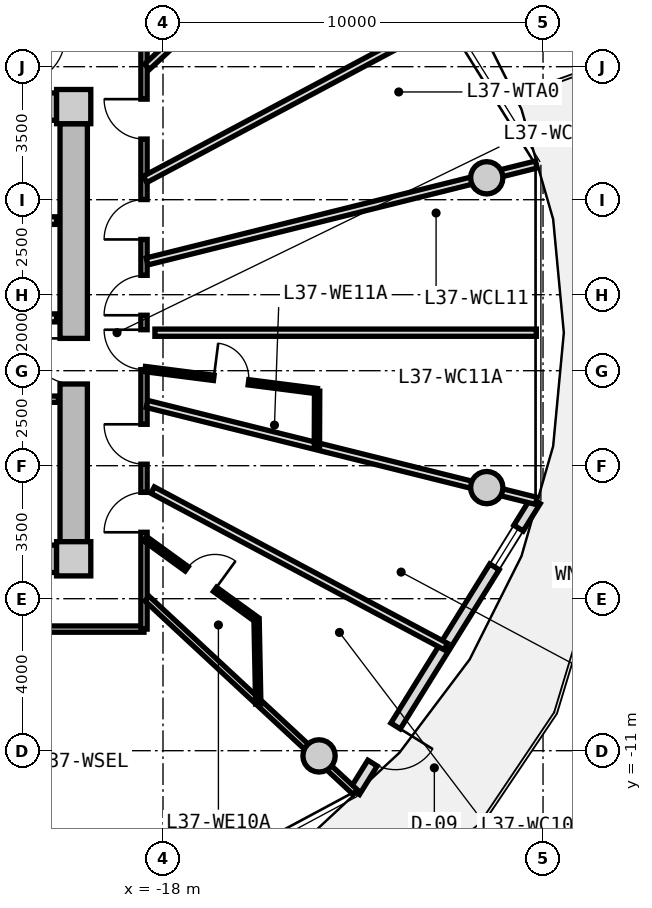
"""IFC4 building model, lengths in metres.
Left out: names, types, materials, properties, quantities, classifications, styles, units other than length and angle.
Written with IfcOpenShell. Run it as: python <this file> out.ifc"""

import sys

from ifc_helpers import new_model, si_unit, direction, frame, frame_2d, origin, origin_2d, place, context, subcontext, project, spatial, rectangle, circle, extrude, source, transform, mapped, element, fill, save


model = new_model("IFC4")
c1 = context("Model", 3, precision=1e-05, world=origin(), true_north=direction((0.0, 1.0)))
c2 = subcontext(c1, "Body", "Model", "MODEL_VIEW")
j1 = project(units=[si_unit("LENGTHUNIT", "METRE"), si_unit("PLANEANGLEUNIT", "RADIAN")], contexts=[c1])
p1 = place(None, origin())
s1 = spatial("IfcSite", under=j1, at=p1, CompositionType="ELEMENT")
p2 = place(p1, origin())
s2 = spatial("IfcBuilding", under=s1, at=p2, CompositionType="ELEMENT")
p3 = place(p2, frame((0.0, 0.0, 120.65)))
s3 = spatial("IfcBuildingStorey", under=s2, at=p3, CompositionType="ELEMENT", Elevation=120.65)
m1 = source(origin(), c2, "Body", "SweptSolid", [
    extrude(rectangle(XDim=0.9, YDim=0.9, at=origin_2d()), origin(), (0.0, 0.0, 1.0), 3.05),
])
for number, where, z_axis, x_axis in (
    (1, (-20.35, -5.95, 0.0), (0.0, 0.0, 1.0), (1.0, 0.0, 0.0)),
    (2, (-20.35, 5.95, 0.0), (0.0, 0.0, 1.0), (1.0, 0.0, 0.0)),
):
    element("IfcColumn", number, at=place(p3, frame(where, z_axis=z_axis, x_axis=x_axis)), inside=s3, PredefinedType="COLUMN", context=c2, shape_type="MappedRepresentation", body=[
        mapped(m1, transform((0.0, 0.0, 0.0), x_axis=(1.0, 0.0, 0.0), y_axis=(0.0, 1.0, 0.0), z_axis=(0.0, 0.0, 1.0), scale=1.0)),
    ])
m2 = source(origin(), c2, "Body", "SweptSolid", [
    extrude(rectangle(XDim=14.4, YDim=0.72, at=frame_2d((7.2, 0.0))), origin(), (0.0, 0.0, 1.0), 2.79),
])
for number, where, z_axis, x_axis in (
    (3, (-35.2, 5.95, 0.0), (0.0, 0.0, 1.0), (1.0, 0.0, 0.0)),
    (4, (-20.8, -5.95, 0.0), (0.0, 0.0, 1.0), (-1.0, 0.0, 0.0)),
):
    element("IfcWall", number, at=place(p3, frame(where, z_axis=z_axis, x_axis=x_axis)), inside=s3, PredefinedType="SHEAR", context=c2, shape_type="MappedRepresentation", body=[
        mapped(m2, transform((0.0, 0.0, 0.0), x_axis=(1.0, 0.0, 0.0), y_axis=(0.0, 1.0, 0.0), z_axis=(0.0, 0.0, 1.0), scale=1.0)),
    ])
m3 = source(origin(), c2, "Body", "SweptSolid", [
    extrude(rectangle(XDim=11.0, YDim=0.72, at=frame_2d((5.5, 0.0))), origin(), (0.0, 0.0, 1.0), 2.79),
])
p4 = place(p3, frame((-20.35, 5.5, 0.0), z_axis=(0.0, 0.0, 1.0), x_axis=(0.0, -1.0, 0.0)))
e5 = element("IfcWall", 5, at=p4, inside=s3, PredefinedType="SHEAR", context=c2, shape_type="MappedRepresentation", body=[
    mapped(m3, transform((0.0, 0.0, 0.0), x_axis=(1.0, 0.0, 0.0), y_axis=(0.0, 1.0, 0.0), z_axis=(0.0, 0.0, 1.0), scale=1.0)),
])
p5 = place(p4, frame((5.65, 0.0, 0.0)))
e6 = element("IfcOpeningElement", 6, at=p5, cuts=e5, PredefinedType="OPENING", context=c2, shape_type="SweptSolid", body=[
    extrude(rectangle(XDim=1.2, YDim=2.15, at=frame_2d((0.6, 1.075))), frame((0.0, 0.37, 0.0), z_axis=(0.0, -1.0, 0.0), x_axis=(1.0, 0.0, 0.0)), (0.0, 0.0, 1.0), 0.74),
])
m4 = source(origin(), c2, "Body", "SweptSolid", [
    extrude(circle(Radius=0.425, at=origin_2d()), origin(), (0.0, 0.0, 1.0), 3.05),
])
for number, where, z_axis, x_axis in (
    (7, (-9.481, 4.076, 0.0), (0.0, 0.0, 1.0), (1.0, 0.0, 0.0)),
    (8, (-13.894, -11.137, 0.0), (0.0, 0.0, 1.0), (1.0, 0.0, 0.0)),
    (9, (-9.481, -4.076, 0.0), (0.0, 0.0, 1.0), (1.0, 0.0, 0.0)),
):
    element("IfcColumn", number, at=place(p3, frame(where, z_axis=z_axis, x_axis=x_axis)), inside=s3, PredefinedType="COLUMN", context=c2, shape_type="MappedRepresentation", body=[
        mapped(m4, transform((0.0, 0.0, 0.0), x_axis=(1.0, 0.0, 0.0), y_axis=(0.0, 1.0, 0.0), z_axis=(0.0, 0.0, 1.0), scale=1.0)),
    ])
m5 = source(origin(), c2, "Body", "SweptSolid", [
    extrude(rectangle(XDim=9.014, YDim=0.29, at=frame_2d((4.507, 0.0))), origin(), (0.0, 0.0, 1.0), 2.79),
])
p6 = place(p3, frame((-8.196, -4.421, 0.0), z_axis=(0.0, 0.0, 1.0), x_axis=(-0.527732945084, -0.849410347637, 0.0)))
e10 = element("IfcWall", 10, at=p6, inside=s3, PredefinedType="SOLIDWALL", context=c2, shape_type="MappedRepresentation", body=[
    mapped(m5, transform((0.0, 0.0, 0.0), x_axis=(1.0, 0.0, 0.0), y_axis=(0.0, 1.0, 0.0), z_axis=(0.0, 0.0, 1.0), scale=1.0)),
])
p7 = place(p6, frame((6.98, 0.0, 0.0)))
e11 = element("IfcOpeningElement", 11, at=p7, cuts=e10, PredefinedType="OPENING", context=c2, shape_type="SweptSolid", body=[
    extrude(rectangle(XDim=1.15, YDim=2.25, at=frame_2d((0.575, 1.125))), frame((0.0, 0.155, 0.0), z_axis=(0.0, -1.0, 0.0), x_axis=(1.0, 0.0, 0.0)), (0.0, 0.0, 1.0), 0.31),
])
p8 = place(p6, frame((0.85, 0.0, 0.85)))
e12 = element("IfcOpeningElement", 12, at=p8, cuts=e10, PredefinedType="OPENING", context=c2, shape_type="SweptSolid", body=[
    extrude(rectangle(XDim=1.2, YDim=1.5, at=frame_2d((0.6, 0.75))), frame((0.0, 0.155, 0.0), z_axis=(0.0, -1.0, 0.0), x_axis=(1.0, 0.0, 0.0)), (0.0, 0.0, 1.0), 0.31),
])
m6 = source(origin(), c2, "Body", "SweptSolid", [
    extrude(rectangle(XDim=3.2, YDim=0.2, at=frame_2d((1.6, 0.0))), origin(), (0.0, 0.0, 1.0), 2.775),
])
p9 = place(p3, frame((-24.0, 2.95, 0.0), z_axis=(0.0, 0.0, 1.0), x_axis=(1.0, 0.0, 0.0)))
e13 = element("IfcWall", 13, at=p9, inside=s3, PredefinedType="PARTITIONING", context=c2, shape_type="MappedRepresentation", body=[
    mapped(m6, transform((0.0, 0.0, 0.0), x_axis=(1.0, 0.0, 0.0), y_axis=(0.0, 1.0, 0.0), z_axis=(0.0, 0.0, 1.0), scale=1.0)),
])
m7 = source(origin(), c2, "Body", "SweptSolid", [
    extrude(rectangle(XDim=6.66, YDim=0.21, at=frame_2d((3.33, 0.0))), origin(), (0.0, 0.0, 1.0), 2.775),
])
p10 = place(p3, frame((-27.46, 0.39, 0.0), z_axis=(0.0, 0.0, 1.0), x_axis=(1.0, 0.0, 0.0)))
e14 = element("IfcWall", 14, at=p10, inside=s3, PredefinedType="PARTITIONING", context=c2, shape_type="MappedRepresentation", body=[
    mapped(m7, transform((0.0, 0.0, 0.0), x_axis=(1.0, 0.0, 0.0), y_axis=(0.0, 1.0, 0.0), z_axis=(0.0, 0.0, 1.0), scale=1.0)),
])
p11 = place(p10, frame((1.0, 0.0, 0.0)))
e15 = element("IfcOpeningElement", 15, at=p11, cuts=e14, PredefinedType="OPENING", context=c2, shape_type="SweptSolid", body=[
    extrude(rectangle(XDim=1.2, YDim=2.15, at=frame_2d((0.6, 1.075))), frame((0.0, 0.115, 0.0), z_axis=(0.0, -1.0, 0.0), x_axis=(1.0, 0.0, 0.0)), (0.0, 0.0, 1.0), 0.23),
])
m8 = source(origin(), c2, "Body", "SweptSolid", [
    extrude(rectangle(XDim=2.7, YDim=0.165, at=frame_2d((1.35, 0.0))), origin(), (0.0, 0.0, 1.0), 2.775),
])
p12 = place(p3, frame((-23.45, -1.75, 0.0), z_axis=(0.0, 0.0, 1.0), x_axis=(1.0, 0.0, 0.0)))
e16 = element("IfcWall", 16, at=p12, inside=s3, PredefinedType="PARTITIONING", context=c2, shape_type="MappedRepresentation", body=[
    mapped(m8, transform((0.0, 0.0, 0.0), x_axis=(1.0, 0.0, 0.0), y_axis=(0.0, 1.0, 0.0), z_axis=(0.0, 0.0, 1.0), scale=1.0)),
])
p13 = place(p12, frame((0.85, 0.0, 0.0)))
e17 = element("IfcOpeningElement", 17, at=p13, cuts=e16, PredefinedType="OPENING", context=c2, shape_type="SweptSolid", body=[
    extrude(rectangle(XDim=0.925, YDim=2.1, at=frame_2d((0.462, 1.05))), frame((0.0, 0.093, 0.0), z_axis=(0.0, -1.0, 0.0), x_axis=(1.0, 0.0, 0.0)), (0.0, 0.0, 1.0), 0.185),
])
m9 = source(origin(), c2, "Body", "SweptSolid", [
    extrude(rectangle(XDim=8.6, YDim=0.165, at=frame_2d((4.3, 0.0))), origin(), (0.0, 0.0, 1.0), 2.775),
])
p14 = place(p3, frame((-18.5, -7.8, 0.0), z_axis=(0.0, 0.0, 1.0), x_axis=(-1.0, 0.0, 0.0)))
e18 = element("IfcWall", 18, at=p14, inside=s3, PredefinedType="PARTITIONING", context=c2, shape_type="MappedRepresentation", body=[
    mapped(m9, transform((0.0, 0.0, 0.0), x_axis=(1.0, 0.0, 0.0), y_axis=(0.0, 1.0, 0.0), z_axis=(0.0, 0.0, 1.0), scale=1.0)),
])
p15 = place(p14, frame((3.509, 0.0, 0.0)))
e19 = element("IfcOpeningElement", 19, at=p15, cuts=e18, PredefinedType="OPENING", context=c2, shape_type="SweptSolid", body=[
    extrude(rectangle(XDim=1.05, YDim=2.15, at=frame_2d((0.525, 1.075))), frame((0.0, 0.093, 0.0), z_axis=(0.0, -1.0, 0.0), x_axis=(1.0, 0.0, 0.0)), (0.0, 0.0, 1.0), 0.185),
])
m10 = source(origin(), c2, "Body", "SweptSolid", [
    extrude(rectangle(XDim=15.6, YDim=0.165, at=frame_2d((7.8, 0.0))), origin(), (0.0, 0.0, 1.0), 2.775),
])
p16 = place(p3, frame((-18.5, 7.8, 0.0), z_axis=(0.0, 0.0, 1.0), x_axis=(0.0, -1.0, 0.0)))
e20 = element("IfcWall", 20, at=p16, inside=s3, PredefinedType="PARTITIONING", context=c2, shape_type="MappedRepresentation", body=[
    mapped(m10, transform((0.0, 0.0, 0.0), x_axis=(1.0, 0.0, 0.0), y_axis=(0.0, 1.0, 0.0), z_axis=(0.0, 0.0, 1.0), scale=1.0)),
])
p17 = place(p16, frame((12.002, 0.0, 0.0)))
e21 = element("IfcOpeningElement", 21, at=p17, cuts=e20, PredefinedType="OPENING", context=c2, shape_type="SweptSolid", body=[
    extrude(rectangle(XDim=1.05, YDim=2.15, at=frame_2d((0.525, 1.075))), frame((0.0, 0.093, 0.0), z_axis=(0.0, -1.0, 0.0), x_axis=(1.0, 0.0, 0.0)), (0.0, 0.0, 1.0), 0.185),
])
p18 = place(p16, frame((10.211, 0.0, 0.0)))
e22 = element("IfcOpeningElement", 22, at=p18, cuts=e20, PredefinedType="OPENING", context=c2, shape_type="SweptSolid", body=[
    extrude(rectangle(XDim=1.05, YDim=2.15, at=frame_2d((0.525, 1.075))), frame((0.0, 0.093, 0.0), z_axis=(0.0, -1.0, 0.0), x_axis=(1.0, 0.0, 0.0)), (0.0, 0.0, 1.0), 0.185),
])
p19 = place(p16, frame((7.722, 0.0, 0.0)))
e23 = element("IfcOpeningElement", 23, at=p19, cuts=e20, PredefinedType="OPENING", context=c2, shape_type="SweptSolid", body=[
    extrude(rectangle(XDim=1.05, YDim=2.15, at=frame_2d((0.525, 1.075))), frame((0.0, 0.093, 0.0), z_axis=(0.0, -1.0, 0.0), x_axis=(1.0, 0.0, 0.0)), (0.0, 0.0, 1.0), 0.185),
])
p20 = place(p16, frame((6.291, 0.0, 0.0)))
e24 = element("IfcOpeningElement", 24, at=p20, cuts=e20, PredefinedType="OPENING", context=c2, shape_type="SweptSolid", body=[
    extrude(rectangle(XDim=1.05, YDim=2.15, at=frame_2d((0.525, 1.075))), frame((0.0, 0.093, 0.0), z_axis=(0.0, -1.0, 0.0), x_axis=(1.0, 0.0, 0.0)), (0.0, 0.0, 1.0), 0.185),
])
p21 = place(p16, frame((4.296, 0.0, 0.0)))
e25 = element("IfcOpeningElement", 25, at=p21, cuts=e20, PredefinedType="OPENING", context=c2, shape_type="SweptSolid", body=[
    extrude(rectangle(XDim=1.05, YDim=2.15, at=frame_2d((0.525, 1.075))), frame((0.0, 0.093, 0.0), z_axis=(0.0, -1.0, 0.0), x_axis=(1.0, 0.0, 0.0)), (0.0, 0.0, 1.0), 0.185),
])
p22 = place(p16, frame((1.654, 0.0, 0.0)))
e26 = element("IfcOpeningElement", 26, at=p22, cuts=e20, PredefinedType="OPENING", context=c2, shape_type="SweptSolid", body=[
    extrude(rectangle(XDim=1.05, YDim=2.15, at=frame_2d((0.525, 1.075))), frame((0.0, 0.093, 0.0), z_axis=(0.0, -1.0, 0.0), x_axis=(1.0, 0.0, 0.0)), (0.0, 0.0, 1.0), 0.185),
])
m11 = source(origin(), c2, "Body", "SweptSolid", [
    extrude(rectangle(XDim=7.482, YDim=0.165, at=frame_2d((3.741, 0.0))), origin(), (0.0, 0.0, 1.0), 2.275),
])
p23 = place(p3, frame((-18.42, -6.998, 0.0), z_axis=(0.0, 0.0, 1.0), x_axis=(0.732508698043, -0.680757671489, 0.0)))
e27 = element("IfcWall", 27, at=p23, inside=s3, PredefinedType="PARTITIONING", context=c2, shape_type="MappedRepresentation", body=[
    mapped(m11, transform((0.0, 0.0, 0.0), x_axis=(1.0, 0.0, 0.0), y_axis=(0.0, 1.0, 0.0), z_axis=(0.0, 0.0, 1.0), scale=1.0)),
])
m12 = source(origin(), c2, "Body", "SweptSolid", [
    extrude(rectangle(XDim=10.556, YDim=0.19, at=frame_2d((5.278, 0.0))), origin(), (0.0, 0.0, 1.0), 2.275),
])
p24 = place(p3, frame((-18.42, -1.875, 0.0), z_axis=(0.0, 0.0, 1.0), x_axis=(0.970363857851, -0.241648470667, 0.0)))
e28 = element("IfcWall", 28, at=p24, inside=s3, PredefinedType="PARTITIONING", context=c2, shape_type="MappedRepresentation", body=[
    mapped(m12, transform((0.0, 0.0, 0.0), x_axis=(1.0, 0.0, 0.0), y_axis=(0.0, 1.0, 0.0), z_axis=(0.0, 0.0, 1.0), scale=1.0)),
])
m13 = source(origin(), c2, "Body", "SweptSolid", [
    extrude(rectangle(XDim=8.744, YDim=0.19, at=frame_2d((4.372, 0.0))), origin(), (0.0, 0.0, 1.0), 2.775),
])
p25 = place(p3, frame((-18.273, -4.142, 0.0), z_axis=(0.0, 0.0, 1.0), x_axis=(0.882252449936, -0.470776607938, 0.0)))
e29 = element("IfcWall", 29, at=p25, inside=s3, PredefinedType="PARTITIONING", context=c2, shape_type="MappedRepresentation", body=[
    mapped(m13, transform((0.0, 0.0, 0.0), x_axis=(1.0, 0.0, 0.0), y_axis=(0.0, 1.0, 0.0), z_axis=(0.0, 0.0, 1.0), scale=1.0)),
])
m14 = source(origin(), c2, "Body", "SweptSolid", [
    extrude(rectangle(XDim=3.621, YDim=0.14, at=frame_2d((1.811, 0.0))), origin(), (0.0, 0.0, 1.0), 2.775),
])
p26 = place(p3, frame((-18.47, -5.422, 0.0), z_axis=(0.0, 0.0, 1.0), x_axis=(0.80968252222, -0.586868139544, 0.0)))
e30 = element("IfcWall", 30, at=p26, inside=s3, PredefinedType="PARTITIONING", context=c2, shape_type="MappedRepresentation", body=[
    mapped(m14, transform((0.0, 0.0, 0.0), x_axis=(1.0, 0.0, 0.0), y_axis=(0.0, 1.0, 0.0), z_axis=(0.0, 0.0, 1.0), scale=1.0)),
])
p27 = place(p26, frame((1.351, 0.0, 0.0)))
e31 = element("IfcOpeningElement", 31, at=p27, cuts=e30, PredefinedType="OPENING", context=c2, shape_type="SweptSolid", body=[
    extrude(rectangle(XDim=0.92, YDim=2.1, at=frame_2d((0.46, 1.05))), frame((0.0, 0.08, 0.0), z_axis=(0.0, -1.0, 0.0), x_axis=(1.0, 0.0, 0.0)), (0.0, 0.0, 1.0), 0.16),
])
m15 = source(origin(), c2, "Body", "SweptSolid", [
    extrude(rectangle(XDim=2.225, YDim=0.14, at=frame_2d((1.112, 0.0))), origin(), (0.0, 0.0, 1.0), 2.775),
])
p28 = place(p3, frame((-15.538, -7.547, 0.0), z_axis=(0.0, 0.0, 1.0), x_axis=(0.019971869027, -0.999800542332, 0.0)))
e32 = element("IfcWall", 32, at=p28, inside=s3, PredefinedType="PARTITIONING", context=c2, shape_type="MappedRepresentation", body=[
    mapped(m15, transform((0.0, 0.0, 0.0), x_axis=(1.0, 0.0, 0.0), y_axis=(0.0, 1.0, 0.0), z_axis=(0.0, 0.0, 1.0), scale=1.0)),
])
p29 = place(p3, frame((-18.42, 1.875, 0.0), z_axis=(0.0, 0.0, 1.0), x_axis=(0.970363857851, 0.241648470667, 0.0)))
e33 = element("IfcWall", 33, at=p29, inside=s3, PredefinedType="PARTITIONING", context=c2, shape_type="MappedRepresentation", body=[
    mapped(m12, transform((0.0, 0.0, 0.0), x_axis=(1.0, 0.0, 0.0), y_axis=(0.0, 1.0, 0.0), z_axis=(0.0, 0.0, 1.0), scale=1.0)),
])
m16 = source(origin(), c2, "Body", "SweptSolid", [
    extrude(rectangle(XDim=10.036, YDim=0.19, at=frame_2d((5.018, 0.0))), origin(), (0.0, 0.0, 1.0), 2.775),
])
p30 = place(p3, frame((-18.213, 0.0, 0.0), z_axis=(0.0, 0.0, 1.0), x_axis=(1.0, 0.0, 0.0)))
e34 = element("IfcWall", 34, at=p30, inside=s3, PredefinedType="PARTITIONING", context=c2, shape_type="MappedRepresentation", body=[
    mapped(m16, transform((0.0, 0.0, 0.0), x_axis=(1.0, 0.0, 0.0), y_axis=(0.0, 1.0, 0.0), z_axis=(0.0, 0.0, 1.0), scale=1.0)),
])
m17 = source(origin(), c2, "Body", "SweptSolid", [
    extrude(rectangle(XDim=4.562, YDim=0.14, at=frame_2d((2.281, 0.0))), origin(), (0.0, 0.0, 1.0), 2.775),
])
p31 = place(p3, frame((-18.47, -0.958, 0.0), z_axis=(0.0, 0.0, 1.0), x_axis=(0.991904666356, -0.126984774129, 0.0)))
e35 = element("IfcWall", 35, at=p31, inside=s3, PredefinedType="PARTITIONING", context=c2, shape_type="MappedRepresentation", body=[
    mapped(m17, transform((0.0, 0.0, 0.0), x_axis=(1.0, 0.0, 0.0), y_axis=(0.0, 1.0, 0.0), z_axis=(0.0, 0.0, 1.0), scale=1.0)),
])
p32 = place(p31, frame((1.821, 0.0, 0.0)))
e36 = element("IfcOpeningElement", 36, at=p32, cuts=e35, PredefinedType="OPENING", context=c2, shape_type="SweptSolid", body=[
    extrude(rectangle(XDim=0.92, YDim=2.1, at=frame_2d((0.46, 1.05))), frame((0.0, 0.08, 0.0), z_axis=(0.0, -1.0, 0.0), x_axis=(1.0, 0.0, 0.0)), (0.0, 0.0, 1.0), 0.16),
])
m18 = source(origin(), c2, "Body", "SweptSolid", [
    extrude(rectangle(XDim=1.468, YDim=0.14, at=frame_2d((0.734, 0.0))), origin(), (0.0, 0.0, 1.0), 2.775),
])
p33 = place(p3, frame((-13.945, -1.537, 0.0), z_axis=(0.0, 0.0, 1.0), x_axis=(-0.00399198416, -0.999992031999, 0.0)))
e37 = element("IfcWall", 37, at=p33, inside=s3, PredefinedType="PARTITIONING", context=c2, shape_type="MappedRepresentation", body=[
    mapped(m18, transform((0.0, 0.0, 0.0), x_axis=(1.0, 0.0, 0.0), y_axis=(0.0, 1.0, 0.0), z_axis=(0.0, 0.0, 1.0), scale=1.0)),
])
m19 = source(origin(), c2, "Body", "SweptSolid", [
    extrude(rectangle(XDim=7.482, YDim=0.19, at=frame_2d((3.741, 0.0))), origin(), (0.0, 0.0, 1.0), 2.275),
])
p34 = place(p3, frame((-18.42, 6.998, 0.0), z_axis=(0.0, 0.0, 1.0), x_axis=(0.732508698043, 0.680757671489, 0.0)))
e38 = element("IfcWall", 38, at=p34, inside=s3, PredefinedType="PARTITIONING", context=c2, shape_type="MappedRepresentation", body=[
    mapped(m19, transform((0.0, 0.0, 0.0), x_axis=(1.0, 0.0, 0.0), y_axis=(0.0, 1.0, 0.0), z_axis=(0.0, 0.0, 1.0), scale=1.0)),
])
m20 = source(origin(), c2, "Body", "SweptSolid", [
    extrude(rectangle(XDim=8.968, YDim=0.19, at=frame_2d((4.484, 0.0))), origin(), (0.0, 0.0, 1.0), 2.775),
])
p35 = place(p3, frame((-18.47, 4.036, 0.0), z_axis=(0.0, 0.0, 1.0), x_axis=(0.882202936563, 0.47086938605, 0.0)))
e39 = element("IfcWall", 39, at=p35, inside=s3, PredefinedType="PARTITIONING", context=c2, shape_type="MappedRepresentation", body=[
    mapped(m20, transform((0.0, 0.0, 0.0), x_axis=(1.0, 0.0, 0.0), y_axis=(0.0, 1.0, 0.0), z_axis=(0.0, 0.0, 1.0), scale=1.0)),
])
m21 = source(origin(), c2, "Body", "SweptSolid", [
    extrude(rectangle(XDim=1.15, YDim=2.25, at=frame_2d((0.575, 1.125))), frame((0.0, 0.025, 0.0), z_axis=(0.0, -1.0, 0.0), x_axis=(1.0, 0.0, 0.0)), (0.0, 0.0, 1.0), 0.05),
])
p36 = place(p7, origin())
e40 = element("IfcDoor", 40, at=p36, inside=s3, OperationType="SINGLE_SWING_LEFT", PredefinedType="DOOR", context=c2, shape_type="MappedRepresentation", body=[
    mapped(m21, transform((0.0, 0.0, 0.0), x_axis=(1.0, 0.0, 0.0), y_axis=(0.0, 1.0, 0.0), z_axis=(0.0, 0.0, 1.0), scale=1.0)),
])
fill(e11, e40)
m22 = source(origin(), c2, "Body", "SweptSolid", [
    extrude(rectangle(XDim=1.2, YDim=1.5, at=frame_2d((0.6, 0.75))), frame((0.0, 0.03, 0.0), z_axis=(0.0, -1.0, 0.0), x_axis=(1.0, 0.0, 0.0)), (0.0, 0.0, 1.0), 0.06),
])
p37 = place(p8, origin())
e41 = element("IfcWindow", 41, at=p37, inside=s3, PartitioningType="SINGLE_PANEL", PredefinedType="WINDOW", context=c2, shape_type="MappedRepresentation", body=[
    mapped(m22, transform((0.0, 0.0, 0.0), x_axis=(1.0, 0.0, 0.0), y_axis=(0.0, 1.0, 0.0), z_axis=(0.0, 0.0, 1.0), scale=1.0)),
])
fill(e12, e41)
m23 = source(origin(), c2, "Body", "SweptSolid", [
    extrude(rectangle(XDim=1.2, YDim=2.15, at=frame_2d((0.6, 1.075))), frame((0.0, 0.025, 0.0), z_axis=(0.0, -1.0, 0.0), x_axis=(1.0, 0.0, 0.0)), (0.0, 0.0, 1.0), 0.05),
])
p38 = place(p5, frame((1.2, 0.0, 0.0), z_axis=(0.0, 0.0, 1.0), x_axis=(-1.0, 0.0, 0.0)))
e42 = element("IfcDoor", 42, at=p38, inside=s3, OperationType="SINGLE_SWING_RIGHT", PredefinedType="DOOR", context=c2, shape_type="MappedRepresentation", body=[
    mapped(m23, transform((0.0, 0.0, 0.0), x_axis=(1.0, 0.0, 0.0), y_axis=(0.0, 1.0, 0.0), z_axis=(0.0, 0.0, 1.0), scale=1.0)),
])
fill(e6, e42)
m24 = source(origin(), c2, "Body", "SweptSolid", [
    extrude(rectangle(XDim=1.05, YDim=2.15, at=frame_2d((0.525, 1.075))), frame((0.0, 0.025, 0.0), z_axis=(0.0, -1.0, 0.0), x_axis=(1.0, 0.0, 0.0)), (0.0, 0.0, 1.0), 0.05),
])
p39 = place(p17, frame((1.05, 0.0, 0.0), z_axis=(0.0, 0.0, 1.0), x_axis=(-1.0, 0.0, 0.0)))
e43 = element("IfcDoor", 43, at=p39, inside=s3, OperationType="SINGLE_SWING_LEFT", PredefinedType="DOOR", context=c2, shape_type="MappedRepresentation", body=[
    mapped(m24, transform((0.0, 0.0, 0.0), x_axis=(1.0, 0.0, 0.0), y_axis=(0.0, 1.0, 0.0), z_axis=(0.0, 0.0, 1.0), scale=1.0)),
])
fill(e21, e43)
m25 = source(origin(), c2, "Body", "SweptSolid", [
    extrude(rectangle(XDim=0.92, YDim=2.1, at=frame_2d((0.46, 1.05))), frame((0.0, 0.025, 0.0), z_axis=(0.0, -1.0, 0.0), x_axis=(1.0, 0.0, 0.0)), (0.0, 0.0, 1.0), 0.05),
])
p40 = place(p27, origin())
e44 = element("IfcDoor", 44, at=p40, inside=s3, OperationType="SINGLE_SWING_RIGHT", PredefinedType="DOOR", context=c2, shape_type="MappedRepresentation", body=[
    mapped(m25, transform((0.0, 0.0, 0.0), x_axis=(1.0, 0.0, 0.0), y_axis=(0.0, 1.0, 0.0), z_axis=(0.0, 0.0, 1.0), scale=1.0)),
])
fill(e31, e44)
p41 = place(p18, frame((1.05, 0.0, 0.0), z_axis=(0.0, 0.0, 1.0), x_axis=(-1.0, 0.0, 0.0)))
e45 = element("IfcDoor", 45, at=p41, inside=s3, OperationType="SINGLE_SWING_RIGHT", PredefinedType="DOOR", context=c2, shape_type="MappedRepresentation", body=[
    mapped(m24, transform((0.0, 0.0, 0.0), x_axis=(1.0, 0.0, 0.0), y_axis=(0.0, 1.0, 0.0), z_axis=(0.0, 0.0, 1.0), scale=1.0)),
])
fill(e22, e45)
p42 = place(p19, frame((1.05, 0.0, 0.0), z_axis=(0.0, 0.0, 1.0), x_axis=(-1.0, 0.0, 0.0)))
e46 = element("IfcDoor", 46, at=p42, inside=s3, OperationType="SINGLE_SWING_RIGHT", PredefinedType="DOOR", context=c2, shape_type="MappedRepresentation", body=[
    mapped(m24, transform((0.0, 0.0, 0.0), x_axis=(1.0, 0.0, 0.0), y_axis=(0.0, 1.0, 0.0), z_axis=(0.0, 0.0, 1.0), scale=1.0)),
])
fill(e23, e46)
p43 = place(p32, origin())
e47 = element("IfcDoor", 47, at=p43, inside=s3, OperationType="SINGLE_SWING_LEFT", PredefinedType="DOOR", context=c2, shape_type="MappedRepresentation", body=[
    mapped(m25, transform((0.0, 0.0, 0.0), x_axis=(1.0, 0.0, 0.0), y_axis=(0.0, 1.0, 0.0), z_axis=(0.0, 0.0, 1.0), scale=1.0)),
])
fill(e36, e47)
p44 = place(p20, frame((1.05, 0.0, 0.0), z_axis=(0.0, 0.0, 1.0), x_axis=(-1.0, 0.0, 0.0)))
e48 = element("IfcDoor", 48, at=p44, inside=s3, OperationType="SINGLE_SWING_LEFT", PredefinedType="DOOR", context=c2, shape_type="MappedRepresentation", body=[
    mapped(m24, transform((0.0, 0.0, 0.0), x_axis=(1.0, 0.0, 0.0), y_axis=(0.0, 1.0, 0.0), z_axis=(0.0, 0.0, 1.0), scale=1.0)),
])
fill(e24, e48)
p45 = place(p21, frame((1.05, 0.0, 0.0), z_axis=(0.0, 0.0, 1.0), x_axis=(-1.0, 0.0, 0.0)))
e49 = element("IfcDoor", 49, at=p45, inside=s3, OperationType="SINGLE_SWING_LEFT", PredefinedType="DOOR", context=c2, shape_type="MappedRepresentation", body=[
    mapped(m24, transform((0.0, 0.0, 0.0), x_axis=(1.0, 0.0, 0.0), y_axis=(0.0, 1.0, 0.0), z_axis=(0.0, 0.0, 1.0), scale=1.0)),
])
fill(e25, e49)
p46 = place(p22, frame((1.05, 0.0, 0.0), z_axis=(0.0, 0.0, 1.0), x_axis=(-1.0, 0.0, 0.0)))
e50 = element("IfcDoor", 50, at=p46, inside=s3, OperationType="SINGLE_SWING_RIGHT", PredefinedType="DOOR", context=c2, shape_type="MappedRepresentation", body=[
    mapped(m24, transform((0.0, 0.0, 0.0), x_axis=(1.0, 0.0, 0.0), y_axis=(0.0, 1.0, 0.0), z_axis=(0.0, 0.0, 1.0), scale=1.0)),
])
fill(e26, e50)
save(model, sys.argv[1])
